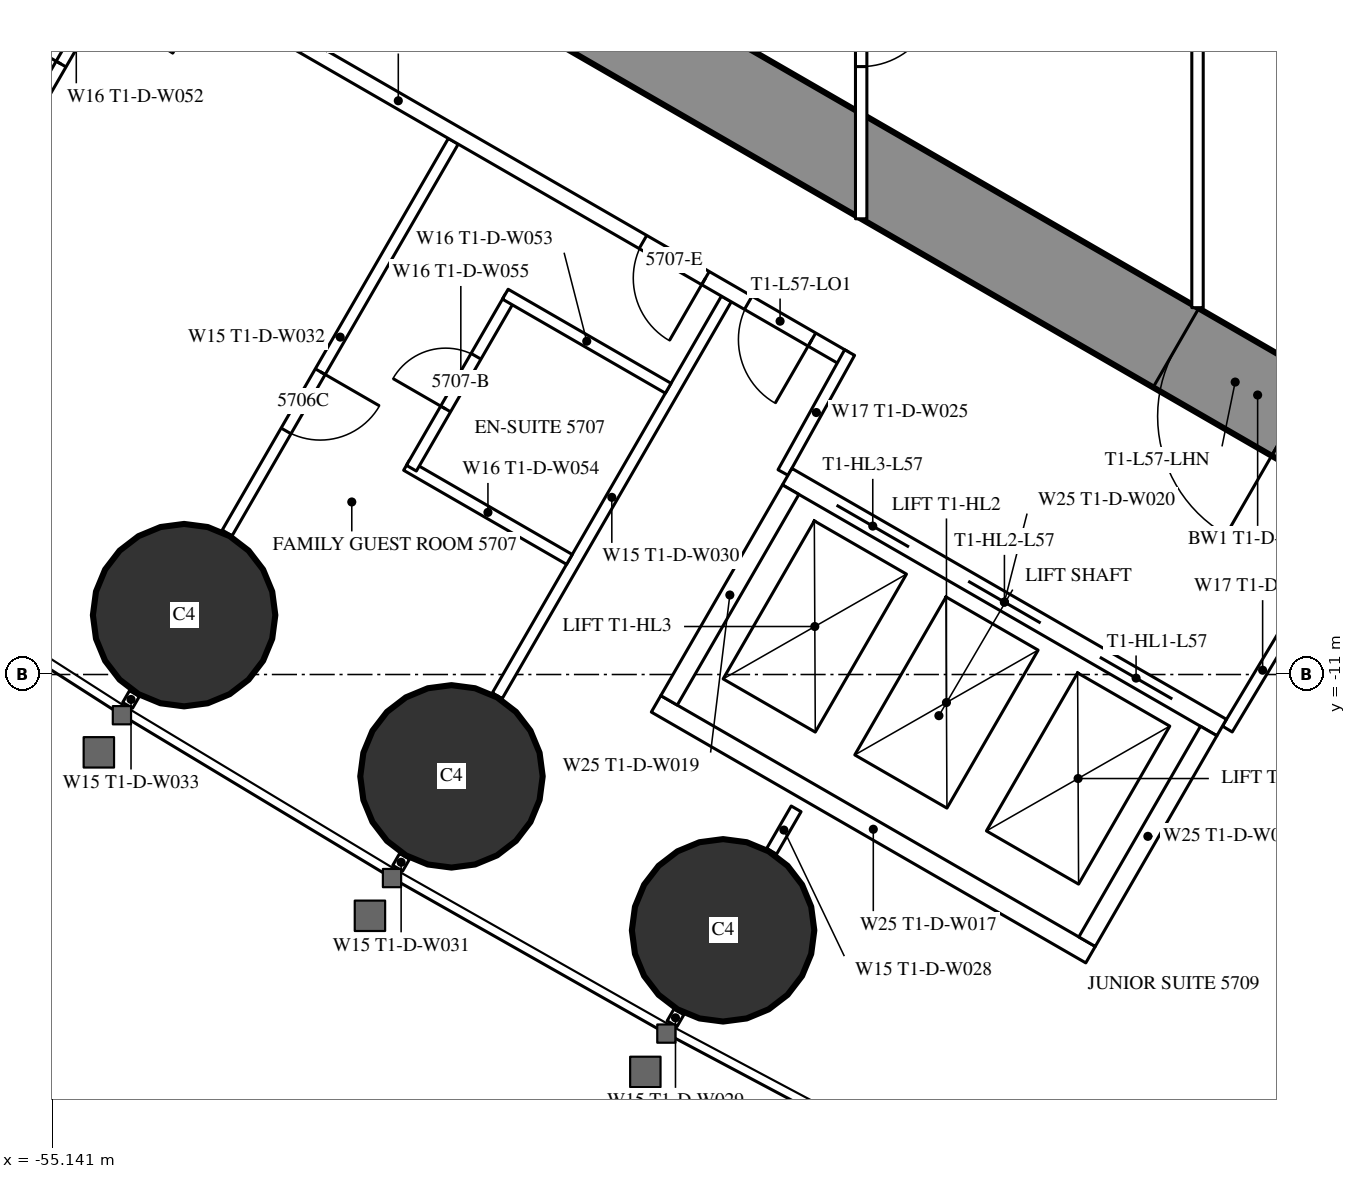
"""IFC4 building model, lengths in metres.
Left out: names, types, materials, properties, quantities, classifications, styles, units other than length and angle.
Written with IfcOpenShell. Run it as: python <this file> out.ifc"""

import sys

from ifc_helpers import new_model, si_unit, direction, frame, frame_2d, origin, origin_2d, place, context, subcontext, project, spatial, rectangle, circle, extrude, element, fill, save


model = new_model("IFC4")
c1 = context("Model", 3, precision=1e-05, world=origin(), true_north=direction((0.0, 1.0)))
c2 = subcontext(c1, "Body", "Model", "MODEL_VIEW")
j1 = project(units=[si_unit("LENGTHUNIT", "METRE"), si_unit("PLANEANGLEUNIT", "RADIAN")], contexts=[c1])
p1 = place(None, origin())
s1 = spatial("IfcSite", under=j1, at=p1, CompositionType="ELEMENT")
p2 = place(p1, origin())
s2 = spatial("IfcBuilding", under=s1, at=p2, CompositionType="ELEMENT")
p3 = place(p2, frame((0.0, 0.0, 215.3)))
s3 = spatial("IfcBuildingStorey", under=s2, at=p3, CompositionType="ELEMENT", Elevation=215.3)
for number, where, z_axis, x_axis in (
    (1, (-53.408, -10.219, 0.0), (0.0, 0.0, 1.0), (1.0, 0.0, 0.0)),
    (2, (-49.89, -12.34, 0.0), (0.0, 0.0, 1.0), (1.0, 0.0, 0.0)),
    (3, (-46.317, -14.365, 0.0), (0.0, 0.0, 1.0), (1.0, 0.0, 0.0)),
):
    element("IfcColumn", number, at=place(p3, frame(where, z_axis=z_axis, x_axis=x_axis)), inside=s3, PredefinedType="COLUMN", context=c2, shape_type="SweptSolid", body=[
        extrude(circle(Radius=1.2, at=origin_2d()), origin(), (0.0, 0.0, 1.0), 3.6),
    ])
p4 = place(p3, frame((-27.2, -14.3, 0.0), z_axis=(0.0, 0.0, 1.0), x_axis=(-0.866024021859, 0.500002393557, 0.0)))
e4 = element("IfcWall", 4, at=p4, inside=s3, PredefinedType="SHEAR", context=c2, shape_type="SweptSolid", body=[
    extrude(rectangle(XDim=27.907, YDim=1.2, at=frame_2d((13.954, 0.0))), origin(), (0.0, 0.0, 1.0), 3.6),
])
p5 = place(p4, frame((4.6, 0.0, 0.0)))
e5 = element("IfcOpeningElement", 5, at=p5, cuts=e4, PredefinedType="OPENING", context=c2, shape_type="SweptSolid", body=[
    extrude(rectangle(XDim=1.0, YDim=2.2, at=frame_2d((0.5, 1.1))), frame((0.0, 0.61, 0.0), z_axis=(0.0, -1.0, 0.0), x_axis=(1.0, 0.0, 0.0)), (0.0, 0.0, 1.0), 1.22),
])
p6 = place(p4, frame((13.395, 0.0, 0.0)))
e6 = element("IfcOpeningElement", 6, at=p6, cuts=e4, PredefinedType="OPENING", context=c2, shape_type="SweptSolid", body=[
    extrude(rectangle(XDim=1.8, YDim=2.2, at=frame_2d((0.9, 1.1))), frame((0.0, 0.61, 0.0), z_axis=(0.0, -1.0, 0.0), x_axis=(1.0, 0.0, 0.0)), (0.0, 0.0, 1.0), 1.22),
])
p7 = place(p3, frame((-46.898, -15.439, 0.0), z_axis=(0.0, 0.0, 1.0), x_axis=(-0.500232303069, -0.865891241997, 0.0)))
e7 = element("IfcWall", 7, at=p7, inside=s3, PredefinedType="PARTITIONING", context=c2, shape_type="SweptSolid", body=[
    extrude(rectangle(XDim=0.18, YDim=0.15, at=frame_2d((0.09, 0.0))), origin(), (0.0, 0.0, 1.0), 2.45),
])
p8 = place(p3, frame((-46.274, -6.059, 0.0), z_axis=(0.0, 0.0, 1.0), x_axis=(-0.500020471368, -0.866013584312, 0.0)))
e8 = element("IfcWall", 8, at=p8, inside=s3, PredefinedType="PARTITIONING", context=c2, shape_type="SweptSolid", body=[
    extrude(rectangle(XDim=6.028, YDim=0.15, at=frame_2d((3.014, 0.0))), origin(), (0.0, 0.0, 1.0), 2.45),
])
p9 = place(p3, frame((-50.508, -13.392, 0.0), z_axis=(0.0, 0.0, 1.0), x_axis=(-0.499644091975, -0.866230789891, 0.0)))
e9 = element("IfcWall", 9, at=p9, inside=s3, PredefinedType="PARTITIONING", context=c2, shape_type="SweptSolid", body=[
    extrude(rectangle(XDim=0.18, YDim=0.15, at=frame_2d((0.09, 0.0))), origin(), (0.0, 0.0, 1.0), 2.45),
])
p10 = place(p3, frame((-49.866, -3.985, 0.0), z_axis=(0.0, 0.0, 1.0), x_axis=(-0.500000694566, -0.866025002776, 0.0)))
e10 = element("IfcWall", 10, at=p10, inside=s3, PredefinedType="PARTITIONING", context=c2, shape_type="SweptSolid", body=[
    extrude(rectangle(XDim=5.95, YDim=0.15, at=frame_2d((2.975, 0.0))), origin(), (0.0, 0.0, 1.0), 2.45),
])
p11 = place(p10, frame((3.5, 0.0, 0.0)))
e11 = element("IfcOpeningElement", 11, at=p11, cuts=e10, PredefinedType="OPENING", context=c2, shape_type="SweptSolid", body=[
    extrude(rectangle(XDim=0.9, YDim=2.2, at=frame_2d((0.45, 1.1))), frame((0.0, 0.085, 0.0), z_axis=(0.0, -1.0, 0.0), x_axis=(1.0, 0.0, 0.0)), (0.0, 0.0, 1.0), 0.17),
])
p12 = place(p3, frame((-54.061, -11.25, 0.0), z_axis=(0.0, 0.0, 1.0), x_axis=(-0.500391173478, -0.865799441849, 0.0)))
e12 = element("IfcWall", 12, at=p12, inside=s3, PredefinedType="PARTITIONING", context=c2, shape_type="SweptSolid", body=[
    extrude(rectangle(XDim=0.179, YDim=0.15, at=frame_2d((0.089, 0.0))), origin(), (0.0, 0.0, 1.0), 2.45),
])
p13 = place(p3, frame((-45.356, -12.767, 0.0), z_axis=(0.0, 0.0, 1.0), x_axis=(-0.499886366516, -0.866091000168, 0.0)))
e13 = element("IfcWall", 13, at=p13, inside=s3, PredefinedType="PARTITIONING", context=c2, shape_type="SweptSolid", body=[
    extrude(rectangle(XDim=0.645, YDim=0.15, at=frame_2d((0.322, 0.0))), origin(), (0.0, 0.0, 1.0), 3.35),
])
p14 = place(p3, frame((-44.715, -6.844, 0.0), z_axis=(0.0, 0.0, 1.0), x_axis=(-0.866025261224, 0.500000246922, 0.0)))
e14 = element("IfcWall", 14, at=p14, inside=s3, PredefinedType="PARTITIONING", context=c2, shape_type="SweptSolid", body=[
    extrude(rectangle(XDim=13.567, YDim=0.2, at=frame_2d((6.783, 0.0))), origin(), (0.0, 0.0, 1.0), 3.35),
])
p15 = place(p14, frame((9.667, 0.0, 0.0)))
e15 = element("IfcOpeningElement", 15, at=p15, cuts=e14, PredefinedType="OPENING", context=c2, shape_type="SweptSolid", body=[
    extrude(rectangle(XDim=0.95, YDim=2.2, at=frame_2d((0.475, 1.1))), frame((0.0, 0.11, 0.0), z_axis=(0.0, -1.0, 0.0), x_axis=(1.0, 0.0, 0.0)), (0.0, 0.0, 1.0), 0.22),
])
p16 = place(p14, frame((2.117, 0.0, 0.0)))
e16 = element("IfcOpeningElement", 16, at=p16, cuts=e14, PredefinedType="OPENING", context=c2, shape_type="SweptSolid", body=[
    extrude(rectangle(XDim=0.95, YDim=2.2, at=frame_2d((0.475, 1.1))), frame((0.0, 0.11, 0.0), z_axis=(0.0, -1.0, 0.0), x_axis=(1.0, 0.0, 0.0)), (0.0, 0.0, 1.0), 0.22),
])
p17 = place(p14, frame((0.5, 0.0, 0.0)))
e17 = element("IfcOpeningElement", 17, at=p17, cuts=e14, PredefinedType="OPENING", context=c2, shape_type="SweptSolid", body=[
    extrude(rectangle(XDim=0.967, YDim=2.2, at=frame_2d((0.483, 1.1))), frame((0.0, 0.11, 0.0), z_axis=(0.0, -1.0, 0.0), x_axis=(1.0, 0.0, 0.0)), (0.0, 0.0, 1.0), 0.22),
])
for number, where, z_axis, x_axis in (
    (18, (-39.683, -11.718, 0.0), (0.0, 0.0, 1.0), (0.514, 0.858, 0.0)),
    (19, (-44.652, -6.764, 0.0), (0.0, 0.0, 1.0), (-0.485, -0.874, 0.0)),
):
    element("IfcWall", number, at=place(p3, frame(where, z_axis=z_axis, x_axis=x_axis)), inside=s3, PredefinedType="PARTITIONING", context=c2, shape_type="SweptSolid", body=[
        extrude(rectangle(XDim=1.805, YDim=0.15, at=frame_2d((0.903, 0.0))), origin(), (0.0, 0.0, 1.0), 3.35),
    ])
p18 = place(p3, frame((-54.176, -1.497, 0.0), z_axis=(0.0, 0.0, 1.0), x_axis=(-0.500006934395, -0.866021400173, 0.0)))
e20 = element("IfcWall", 20, at=p18, inside=s3, PredefinedType="PARTITIONING", context=c2, shape_type="SweptSolid", body=[
    extrude(rectangle(XDim=2.6, YDim=0.15, at=frame_2d((1.3, 0.0))), origin(), (0.0, 0.0, 1.0), 3.35),
])
p19 = place(p18, frame((0.9, 0.0, 0.0)))
e21 = element("IfcOpeningElement", 21, at=p19, cuts=e20, PredefinedType="OPENING", context=c2, shape_type="SweptSolid", body=[
    extrude(rectangle(XDim=0.8, YDim=2.2, at=frame_2d((0.4, 1.1))), frame((0.0, 0.085, 0.0), z_axis=(0.0, -1.0, 0.0), x_axis=(1.0, 0.0, 0.0)), (0.0, 0.0, 1.0), 0.17),
])
p20 = place(p3, frame((-48.339, -9.486, 0.0), z_axis=(0.0, 0.0, 1.0), x_axis=(-0.866006523861, 0.500032699561, 0.0)))
e22 = element("IfcWall", 22, at=p20, inside=s3, PredefinedType="PARTITIONING", context=c2, shape_type="SweptSolid", body=[
    extrude(rectangle(XDim=2.475, YDim=0.15, at=frame_2d((1.237, 0.0))), origin(), (0.0, 0.0, 1.0), 3.35),
])
p21 = place(p3, frame((-49.117, -6.034, 0.0), z_axis=(0.0, 0.0, 1.0), x_axis=(-0.500006934395, -0.866021400173, 0.0)))
e23 = element("IfcWall", 23, at=p21, inside=s3, PredefinedType="PARTITIONING", context=c2, shape_type="SweptSolid", body=[
    extrude(rectangle(XDim=2.6, YDim=0.15, at=frame_2d((1.3, 0.0))), origin(), (0.0, 0.0, 1.0), 3.35),
])
p22 = place(p21, frame((0.9, 0.0, 0.0)))
e24 = element("IfcOpeningElement", 24, at=p22, cuts=e23, PredefinedType="OPENING", context=c2, shape_type="SweptSolid", body=[
    extrude(rectangle(XDim=0.8, YDim=2.2, at=frame_2d((0.4, 1.1))), frame((0.0, 0.085, 0.0), z_axis=(0.0, -1.0, 0.0), x_axis=(1.0, 0.0, 0.0)), (0.0, 0.0, 1.0), 0.17),
])
p23 = place(p3, frame((-47.039, -7.234, 0.0), z_axis=(0.0, 0.0, 1.0), x_axis=(-0.866073894602, 0.499916002032, 0.0)))
e25 = element("IfcWall", 25, at=p23, inside=s3, PredefinedType="PARTITIONING", context=c2, shape_type="SweptSolid", body=[
    extrude(rectangle(XDim=2.475, YDim=0.15, at=frame_2d((1.238, 0.0))), origin(), (0.0, 0.0, 1.0), 2.5),
])
p24 = place(p3, frame((-40.075, 6.174, 0.0), z_axis=(0.0, 0.0, 1.0), x_axis=(0.0, -1.0, 0.0)))
e26 = element("IfcWall", 26, at=p24, inside=s3, PredefinedType="PARTITIONING", context=c2, shape_type="SweptSolid", body=[
    extrude(rectangle(XDim=12.348, YDim=0.15, at=frame_2d((6.174, 0.0))), origin(), (0.0, 0.0, 1.0), 3.35),
])
p25 = place(p24, frame((5.274, 0.0, 0.0)))
e27 = element("IfcOpeningElement", 27, at=p25, cuts=e26, PredefinedType="OPENING", context=c2, shape_type="SweptSolid", body=[
    extrude(rectangle(XDim=1.8, YDim=2.2, at=frame_2d((0.9, 1.1))), frame((0.0, 0.085, 0.0), z_axis=(0.0, -1.0, 0.0), x_axis=(1.0, 0.0, 0.0)), (0.0, 0.0, 1.0), 0.17),
])
p26 = place(p3, frame((-44.5, 5.005, 0.0), z_axis=(0.0, 0.0, 1.0), x_axis=(0.0, -1.0, 0.0)))
e28 = element("IfcWall", 28, at=p26, inside=s3, PredefinedType="PARTITIONING", context=c2, shape_type="SweptSolid", body=[
    extrude(rectangle(XDim=10.009, YDim=0.15, at=frame_2d((5.005, 0.0))), origin(), (0.0, 0.0, 1.0), 2.5),
])
p27 = place(p26, frame((2.002, 0.0, 0.0)))
e29 = element("IfcOpeningElement", 29, at=p27, cuts=e28, PredefinedType="OPENING", context=c2, shape_type="SweptSolid", body=[
    extrude(rectangle(XDim=1.0, YDim=2.2, at=frame_2d((0.5, 1.1))), frame((0.0, 0.085, 0.0), z_axis=(0.0, -1.0, 0.0), x_axis=(1.0, 0.0, 0.0)), (0.0, 0.0, 1.0), 0.17),
])
p28 = place(p26, frame((7.007, 0.0, 0.0)))
e30 = element("IfcOpeningElement", 30, at=p28, cuts=e28, PredefinedType="OPENING", context=c2, shape_type="SweptSolid", body=[
    extrude(rectangle(XDim=1.0, YDim=2.2, at=frame_2d((0.5, 1.1))), frame((0.0, 0.085, 0.0), z_axis=(0.0, -1.0, 0.0), x_axis=(1.0, 0.0, 0.0)), (0.0, 0.0, 1.0), 0.17),
])
p29 = place(p3, frame((-39.758, -11.697, 0.0), z_axis=(0.0, 0.0, 1.0), x_axis=(-0.866024194504, 0.500002094529, 0.0)))
e31 = element("IfcWall", 31, at=p29, inside=s3, PredefinedType="PARTITIONING", context=c2, shape_type="SweptSolid", body=[
    extrude(rectangle(XDim=6.6, YDim=0.25, at=frame_2d((3.3, 0.0))), origin(), (0.0, 0.0, 1.0), 3.35),
])
p30 = place(p29, frame((0.75, 0.0, 0.0)))
e32 = element("IfcOpeningElement", 32, at=p30, cuts=e31, PredefinedType="OPENING", context=c2, shape_type="SweptSolid", body=[
    extrude(rectangle(XDim=1.1, YDim=2.2, at=frame_2d((0.55, 1.1))), frame((0.0, 0.135, 0.0), z_axis=(0.0, -1.0, 0.0), x_axis=(1.0, 0.0, 0.0)), (0.0, 0.0, 1.0), 0.27),
])
p31 = place(p29, frame((2.75, 0.0, 0.0)))
e33 = element("IfcOpeningElement", 33, at=p31, cuts=e31, PredefinedType="OPENING", context=c2, shape_type="SweptSolid", body=[
    extrude(rectangle(XDim=1.1, YDim=2.2, at=frame_2d((0.55, 1.1))), frame((0.0, 0.135, 0.0), z_axis=(0.0, -1.0, 0.0), x_axis=(1.0, 0.0, 0.0)), (0.0, 0.0, 1.0), 0.27),
])
p32 = place(p29, frame((4.75, 0.0, 0.0)))
e34 = element("IfcOpeningElement", 34, at=p32, cuts=e31, PredefinedType="OPENING", context=c2, shape_type="SweptSolid", body=[
    extrude(rectangle(XDim=1.1, YDim=2.2, at=frame_2d((0.55, 1.1))), frame((0.0, 0.135, 0.0), z_axis=(0.0, -1.0, 0.0), x_axis=(1.0, 0.0, 0.0)), (0.0, 0.0, 1.0), 0.27),
])
p33 = place(p3, frame((-41.482, -14.686, 0.0), z_axis=(0.0, 0.0, 1.0), x_axis=(-0.86603344179, 0.499986077507, 0.0)))
e35 = element("IfcWall", 35, at=p33, inside=s3, PredefinedType="PARTITIONING", context=c2, shape_type="SweptSolid", body=[
    extrude(rectangle(XDim=6.6, YDim=0.25, at=frame_2d((3.3, 0.0))), origin(), (0.0, 0.0, 1.0), 3.35),
])
for number, where, z_axis, x_axis in (
    (36, (-39.928, -11.743, 0.0), (0.0, 0.0, 1.0), (-0.5, -0.866, 0.0)),
    (37, (-45.428, -8.568, 0.0), (0.0, 0.0, 1.0), (-0.5, -0.866, 0.0)),
):
    element("IfcWall", number, at=place(p3, frame(where, z_axis=z_axis, x_axis=x_axis)), inside=s3, PredefinedType="PARTITIONING", context=c2, shape_type="SweptSolid", body=[
        extrude(rectangle(XDim=3.201, YDim=0.25, at=frame_2d((1.6, 0.0))), origin(), (0.0, 0.0, 1.0), 3.35),
    ])
p34 = place(p19, origin())
e38 = element("IfcDoor", 38, at=p34, inside=s3, OperationType="SINGLE_SWING_RIGHT", PredefinedType="DOOR", context=c2, shape_type="SweptSolid", body=[
    extrude(rectangle(XDim=0.8, YDim=2.2, at=frame_2d((0.4, 1.1))), frame((0.0, 0.025, 0.0), z_axis=(0.0, -1.0, 0.0), x_axis=(1.0, 0.0, 0.0)), (0.0, 0.0, 1.0), 0.05),
])
fill(e21, e38)
p35 = place(p22, origin())
e39 = element("IfcDoor", 39, at=p35, inside=s3, OperationType="SINGLE_SWING_RIGHT", PredefinedType="DOOR", context=c2, shape_type="SweptSolid", body=[
    extrude(rectangle(XDim=0.8, YDim=2.2, at=frame_2d((0.4, 1.1))), frame((0.0, 0.025, 0.0), z_axis=(0.0, -1.0, 0.0), x_axis=(1.0, 0.0, 0.0)), (0.0, 0.0, 1.0), 0.05),
])
fill(e24, e39)
p36 = place(p16, origin())
e40 = element("IfcDoor", 40, at=p36, inside=s3, OperationType="SINGLE_SWING_LEFT", PredefinedType="DOOR", context=c2, shape_type="SweptSolid", body=[
    extrude(rectangle(XDim=0.95, YDim=2.2, at=frame_2d((0.475, 1.1))), frame((0.0, 0.025, 0.0), z_axis=(0.0, -1.0, 0.0), x_axis=(1.0, 0.0, 0.0)), (0.0, 0.0, 1.0), 0.05),
])
fill(e16, e40)
p37 = place(p17, origin())
e41 = element("IfcDoor", 41, at=p37, inside=s3, OperationType="SINGLE_SWING_LEFT", PredefinedType="DOOR", context=c2, shape_type="SweptSolid", body=[
    extrude(rectangle(XDim=0.967, YDim=2.2, at=frame_2d((0.483, 1.1))), frame((0.0, 0.025, 0.0), z_axis=(0.0, -1.0, 0.0), x_axis=(1.0, 0.0, 0.0)), (0.0, 0.0, 1.0), 0.05),
])
fill(e17, e41)
p38 = place(p11, origin())
e42 = element("IfcDoor", 42, at=p38, inside=s3, OperationType="SINGLE_SWING_LEFT", PredefinedType="DOOR", context=c2, shape_type="SweptSolid", body=[
    extrude(rectangle(XDim=0.9, YDim=2.2, at=frame_2d((0.45, 1.1))), frame((0.0, 0.025, 0.0), z_axis=(0.0, -1.0, 0.0), x_axis=(1.0, 0.0, 0.0)), (0.0, 0.0, 1.0), 0.05),
])
fill(e11, e42)
p39 = place(p28, origin())
e43 = element("IfcDoor", 43, at=p39, inside=s3, OperationType="SINGLE_SWING_LEFT", PredefinedType="DOOR", context=c2, shape_type="SweptSolid", body=[
    extrude(rectangle(XDim=1.0, YDim=2.2, at=frame_2d((0.5, 1.1))), frame((0.0, 0.025, 0.0), z_axis=(0.0, -1.0, 0.0), x_axis=(1.0, 0.0, 0.0)), (0.0, 0.0, 1.0), 0.05),
])
fill(e30, e43)
p40 = place(p6, origin())
e44 = element("IfcDoor", 44, at=p40, inside=s3, OperationType="DOUBLE_DOOR_SINGLE_SWING", PredefinedType="DOOR", context=c2, shape_type="SweptSolid", body=[
    extrude(rectangle(XDim=1.8, YDim=2.2, at=frame_2d((0.9, 1.1))), frame((0.0, 0.025, 0.0), z_axis=(0.0, -1.0, 0.0), x_axis=(1.0, 0.0, 0.0)), (0.0, 0.0, 1.0), 0.05),
])
fill(e6, e44)
p41 = place(p30, origin())
e45 = element("IfcDoor", 45, at=p41, inside=s3, OperationType="DOUBLE_DOOR_SLIDING", PredefinedType="USERDEFINED", context=c2, shape_type="SweptSolid", body=[
    extrude(rectangle(XDim=1.1, YDim=2.2, at=frame_2d((0.55, 1.1))), frame((0.0, 0.025, 0.0), z_axis=(0.0, -1.0, 0.0), x_axis=(1.0, 0.0, 0.0)), (0.0, 0.0, 1.0), 0.05),
])
fill(e32, e45)
p42 = place(p31, origin())
e46 = element("IfcDoor", 46, at=p42, inside=s3, OperationType="DOUBLE_DOOR_SLIDING", PredefinedType="USERDEFINED", context=c2, shape_type="SweptSolid", body=[
    extrude(rectangle(XDim=1.1, YDim=2.2, at=frame_2d((0.55, 1.1))), frame((0.0, 0.025, 0.0), z_axis=(0.0, -1.0, 0.0), x_axis=(1.0, 0.0, 0.0)), (0.0, 0.0, 1.0), 0.05),
])
fill(e33, e46)
p43 = place(p32, origin())
e47 = element("IfcDoor", 47, at=p43, inside=s3, OperationType="DOUBLE_DOOR_SLIDING", PredefinedType="USERDEFINED", context=c2, shape_type="SweptSolid", body=[
    extrude(rectangle(XDim=1.1, YDim=2.2, at=frame_2d((0.55, 1.1))), frame((0.0, 0.025, 0.0), z_axis=(0.0, -1.0, 0.0), x_axis=(1.0, 0.0, 0.0)), (0.0, 0.0, 1.0), 0.05),
])
fill(e34, e47)
save(model, sys.argv[1])
